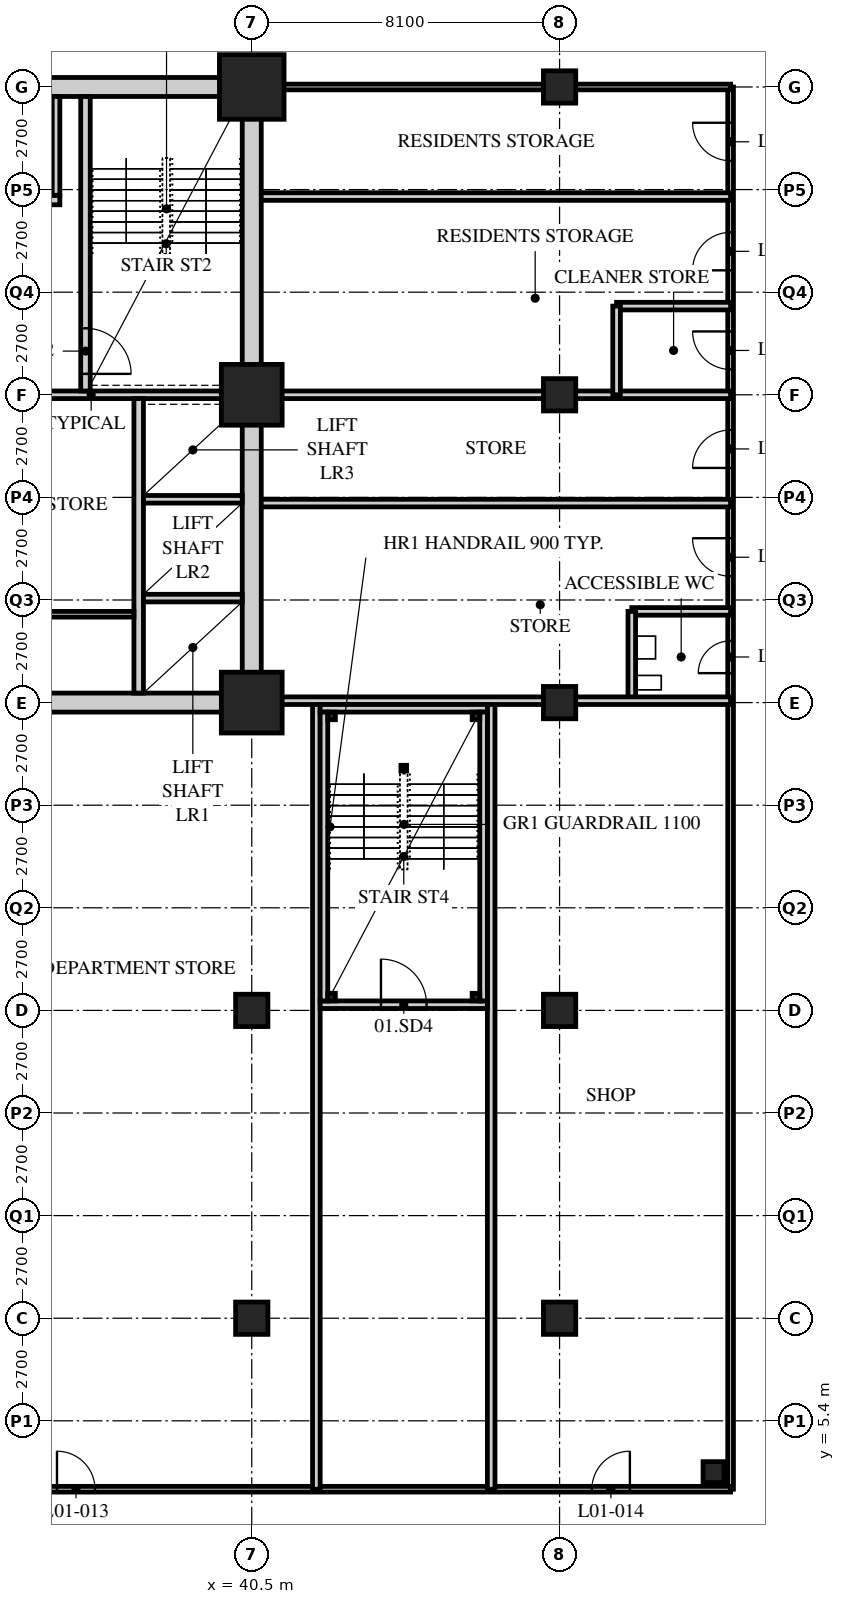
"""IFC4 building model, lengths in metres.
Left out: names, types, materials, properties, quantities, classifications, styles, units other than length and angle.
Written with IfcOpenShell. Run it as: python <this file> out.ifc"""

import sys

from ifc_helpers import new_model, si_unit, direction, frame, frame_2d, origin, origin_2d, place, context, subcontext, project, spatial, rectangle, hollow_rectangle, extrude, element, fill, save


model = new_model("IFC4")
c1 = context("Model", 3, precision=1e-05, world=origin(), true_north=direction((0.0, 1.0)))
c2 = subcontext(c1, "Body", "Model", "MODEL_VIEW")
j1 = project(units=[si_unit("LENGTHUNIT", "METRE"), si_unit("PLANEANGLEUNIT", "RADIAN")], contexts=[c1])
p1 = place(None, origin())
s1 = spatial("IfcSite", under=j1, at=p1, CompositionType="ELEMENT")
p2 = place(p1, origin())
s2 = spatial("IfcBuilding", under=s1, at=p2, CompositionType="ELEMENT")
p3 = place(p2, frame((0.0, 0.0, 6.0)))
s3 = spatial("IfcBuildingStorey", under=s2, at=p3, CompositionType="ELEMENT", Elevation=6.0)
for number, where, z_axis, x_axis in (
    (1, (40.5, 8.1, 0.0), (0.0, 0.0, 1.0), (1.0, 0.0, 0.0)),
    (2, (40.5, 16.2, 0.0), (0.0, 0.0, 1.0), (1.0, 0.0, 0.0)),
):
    element("IfcColumn", number, at=place(p3, frame(where, z_axis=z_axis, x_axis=x_axis)), inside=s3, PredefinedType="COLUMN", context=c2, shape_type="SweptSolid", body=[
        extrude(hollow_rectangle(XDim=0.85, YDim=0.85, WallThickness=0.085, at=origin_2d()), origin(), (0.0, 0.0, 1.0), 5.4),
    ])
for number, where, z_axis, x_axis in (
    (3, (40.5, 24.3, 0.0), (0.0, 0.0, 1.0), (1.0, 0.0, 0.0)),
    (4, (40.5, 32.4, 0.0), (0.0, 0.0, 1.0), (1.0, 0.0, 0.0)),
):
    element("IfcColumn", number, at=place(p3, frame(where, z_axis=z_axis, x_axis=x_axis)), inside=s3, PredefinedType="COLUMN", context=c2, shape_type="SweptSolid", body=[
        extrude(hollow_rectangle(XDim=1.6, YDim=1.6, WallThickness=0.15, at=origin_2d()), origin(), (0.0, 0.0, 1.0), 5.4),
    ])
p4 = place(p3, frame((40.5, 40.5, 0.0), z_axis=(0.0, 0.0, 1.0), x_axis=(1.0, 0.0, 0.0)))
e5 = element("IfcColumn", 5, at=p4, inside=s3, PredefinedType="COLUMN", context=c2, shape_type="SweptSolid", body=[
    extrude(hollow_rectangle(XDim=1.7, YDim=1.7, WallThickness=0.16, at=origin_2d()), origin(), (0.0, 0.0, 1.0), 5.4),
])
for number, where, z_axis, x_axis in (
    (6, (48.6, 8.1, 0.0), (0.0, 0.0, 1.0), (1.0, 0.0, 0.0)),
    (7, (48.6, 16.2, 0.0), (0.0, 0.0, 1.0), (1.0, 0.0, 0.0)),
    (8, (48.6, 24.3, 0.0), (0.0, 0.0, 1.0), (1.0, 0.0, 0.0)),
    (9, (48.6, 32.4, 0.0), (0.0, 0.0, 1.0), (1.0, 0.0, 0.0)),
    (10, (48.6, 40.5, 0.0), (0.0, 0.0, 1.0), (1.0, 0.0, 0.0)),
):
    element("IfcColumn", number, at=place(p3, frame(where, z_axis=z_axis, x_axis=x_axis)), inside=s3, PredefinedType="COLUMN", context=c2, shape_type="SweptSolid", body=[
        extrude(hollow_rectangle(XDim=0.85, YDim=0.85, WallThickness=0.085, at=origin_2d()), origin(), (0.0, 0.0, 1.0), 5.4),
    ])
p5 = place(p3, frame((52.65, 4.05, 0.0), z_axis=(0.0, 0.0, 1.0), x_axis=(1.0, 0.0, 0.0)))
e11 = element("IfcColumn", 11, at=p5, inside=s3, PredefinedType="COLUMN", context=c2, shape_type="SweptSolid", body=[
    extrude(hollow_rectangle(XDim=0.55, YDim=0.55, WallThickness=0.05, at=origin_2d()), origin(), (0.0, 0.0, 1.0), 5.4),
])
p6 = place(p3, frame((53.1, 3.6, 0.0), z_axis=(0.0, 0.0, 1.0), x_axis=(0.0, 1.0, 0.0)))
e12 = element("IfcWall", 12, at=p6, inside=s3, PredefinedType="PARTITIONING", context=c2, shape_type="SweptSolid", body=[
    extrude(rectangle(XDim=36.9, YDim=0.15, at=frame_2d((18.45, 0.0))), origin(), (0.0, 0.0, 1.0), 5.15),
])
p7 = place(p6, frame((21.475, 0.0, 0.0)))
e13 = element("IfcOpeningElement", 13, at=p7, cuts=e12, PredefinedType="OPENING", context=c2, shape_type="SweptSolid", body=[
    extrude(rectangle(XDim=0.85, YDim=2.1, at=frame_2d((0.425, 1.05))), frame((0.0, 0.085, 0.0), z_axis=(0.0, -1.0, 0.0), x_axis=(1.0, 0.0, 0.0)), (0.0, 0.0, 1.0), 0.17),
])
p8 = place(p6, frame((24.025, 0.0, 0.0)))
e14 = element("IfcOpeningElement", 14, at=p8, cuts=e12, PredefinedType="OPENING", context=c2, shape_type="SweptSolid", body=[
    extrude(rectangle(XDim=1.0, YDim=2.1, at=frame_2d((0.5, 1.05))), frame((0.0, 0.085, 0.0), z_axis=(0.0, -1.0, 0.0), x_axis=(1.0, 0.0, 0.0)), (0.0, 0.0, 1.0), 0.17),
])
p9 = place(p6, frame((26.875, 0.0, 0.0)))
e15 = element("IfcOpeningElement", 15, at=p9, cuts=e12, PredefinedType="OPENING", context=c2, shape_type="SweptSolid", body=[
    extrude(rectangle(XDim=1.0, YDim=2.1, at=frame_2d((0.5, 1.05))), frame((0.0, 0.085, 0.0), z_axis=(0.0, -1.0, 0.0), x_axis=(1.0, 0.0, 0.0)), (0.0, 0.0, 1.0), 0.17),
])
p10 = place(p6, frame((29.467, 0.0, 0.0)))
e16 = element("IfcOpeningElement", 16, at=p10, cuts=e12, PredefinedType="OPENING", context=c2, shape_type="SweptSolid", body=[
    extrude(rectangle(XDim=1.0, YDim=2.1, at=frame_2d((0.5, 1.05))), frame((0.0, 0.085, 0.0), z_axis=(0.0, -1.0, 0.0), x_axis=(1.0, 0.0, 0.0)), (0.0, 0.0, 1.0), 0.17),
])
p11 = place(p6, frame((32.075, 0.0, 0.0)))
e17 = element("IfcOpeningElement", 17, at=p11, cuts=e12, PredefinedType="OPENING", context=c2, shape_type="SweptSolid", body=[
    extrude(rectangle(XDim=1.0, YDim=2.1, at=frame_2d((0.5, 1.05))), frame((0.0, 0.085, 0.0), z_axis=(0.0, -1.0, 0.0), x_axis=(1.0, 0.0, 0.0)), (0.0, 0.0, 1.0), 0.17),
])
p12 = place(p6, frame((34.958, 0.0, 0.0)))
e18 = element("IfcOpeningElement", 18, at=p12, cuts=e12, PredefinedType="OPENING", context=c2, shape_type="SweptSolid", body=[
    extrude(rectangle(XDim=1.0, YDim=2.1, at=frame_2d((0.5, 1.05))), frame((0.0, 0.085, 0.0), z_axis=(0.0, -1.0, 0.0), x_axis=(1.0, 0.0, 0.0)), (0.0, 0.0, 1.0), 0.17),
])
p13 = place(p3, frame((53.1, 40.5, 0.0), z_axis=(0.0, 0.0, 1.0), x_axis=(-1.0, 0.0, 0.0)))
e19 = element("IfcWall", 19, at=p13, inside=s3, PredefinedType="PARTITIONING", context=c2, shape_type="SweptSolid", body=[
    extrude(rectangle(XDim=12.4, YDim=0.15, at=frame_2d((6.2, 0.0))), origin(), (0.0, 0.0, 1.0), 4.538),
])
p14 = place(p3, frame((29.56, 3.6, 0.0), z_axis=(0.0, 0.0, 1.0), x_axis=(1.0, 0.0, 0.0)))
e20 = element("IfcWall", 20, at=p14, inside=s3, PredefinedType="PARTITIONING", context=c2, shape_type="SweptSolid", body=[
    extrude(rectangle(XDim=23.54, YDim=0.15, at=frame_2d((11.77, 0.0))), origin(), (0.0, 0.0, 1.0), 5.15),
])
p15 = place(p14, frame((5.815, 0.0, 0.0)))
e21 = element("IfcOpeningElement", 21, at=p15, cuts=e20, PredefinedType="OPENING", context=c2, shape_type="SweptSolid", body=[
    extrude(rectangle(XDim=1.0, YDim=2.1, at=frame_2d((0.5, 1.05))), frame((0.0, 0.085, 0.0), z_axis=(0.0, -1.0, 0.0), x_axis=(1.0, 0.0, 0.0)), (0.0, 0.0, 1.0), 0.17),
])
p16 = place(p14, frame((19.89, 0.0, 0.0)))
e22 = element("IfcOpeningElement", 22, at=p16, cuts=e20, PredefinedType="OPENING", context=c2, shape_type="SweptSolid", body=[
    extrude(rectangle(XDim=1.0, YDim=2.1, at=frame_2d((0.5, 1.05))), frame((0.0, 0.085, 0.0), z_axis=(0.0, -1.0, 0.0), x_axis=(1.0, 0.0, 0.0)), (0.0, 0.0, 1.0), 0.17),
])
p17 = place(p3, frame((40.5, 32.4, 0.0), z_axis=(0.0, 0.0, 1.0), x_axis=(1.0, 0.0, 0.0)))
e23 = element("IfcWall", 23, at=p17, inside=s3, PredefinedType="SOLIDWALL", context=c2, shape_type="SweptSolid", body=[
    extrude(rectangle(XDim=12.6, YDim=0.2, at=frame_2d((6.3, 0.0))), origin(), (0.0, 0.0, 1.0), 4.538),
])
p18 = place(p3, frame((53.1, 26.7, 0.0), z_axis=(0.0, 0.0, 1.0), x_axis=(-1.0, 0.0, 0.0)))
e24 = element("IfcWall", 24, at=p18, inside=s3, PredefinedType="SOLIDWALL", context=c2, shape_type="SweptSolid", body=[
    extrude(rectangle(XDim=2.6, YDim=0.2, at=frame_2d((1.3, 0.0))), origin(), (0.0, 0.0, 1.0), 5.15),
])
p19 = place(p3, frame((50.5, 24.3, 0.0), z_axis=(0.0, 0.0, 1.0), x_axis=(0.0, 1.0, 0.0)))
e25 = element("IfcWall", 25, at=p19, inside=s3, PredefinedType="SOLIDWALL", context=c2, shape_type="SweptSolid", body=[
    extrude(rectangle(XDim=2.4, YDim=0.2, at=frame_2d((1.2, 0.0))), origin(), (0.0, 0.0, 1.0), 5.15),
])
p20 = place(p3, frame((53.1, 29.55, 0.0), z_axis=(0.0, 0.0, 1.0), x_axis=(-1.0, 0.0, 0.0)))
e26 = element("IfcWall", 26, at=p20, inside=s3, PredefinedType="SOLIDWALL", context=c2, shape_type="SweptSolid", body=[
    extrude(rectangle(XDim=12.6, YDim=0.2, at=frame_2d((6.3, 0.0))), origin(), (0.0, 0.0, 1.0), 5.15),
])
p21 = place(p3, frame((53.1, 34.733, 0.0), z_axis=(0.0, 0.0, 1.0), x_axis=(-1.0, 0.0, 0.0)))
e27 = element("IfcWall", 27, at=p21, inside=s3, PredefinedType="SOLIDWALL", context=c2, shape_type="SweptSolid", body=[
    extrude(rectangle(XDim=3.0, YDim=0.2, at=frame_2d((1.5, 0.0))), origin(), (0.0, 0.0, 1.0), 5.15),
])
p22 = place(p3, frame((50.1, 32.4, 0.0), z_axis=(0.0, 0.0, 1.0), x_axis=(0.0, 1.0, 0.0)))
e28 = element("IfcWall", 28, at=p22, inside=s3, PredefinedType="SOLIDWALL", context=c2, shape_type="SweptSolid", body=[
    extrude(rectangle(XDim=2.333, YDim=0.2, at=frame_2d((1.167, 0.0))), origin(), (0.0, 0.0, 1.0), 5.15),
])
p23 = place(p3, frame((53.1, 37.617, 0.0), z_axis=(0.0, 0.0, 1.0), x_axis=(-1.0, 0.0, 0.0)))
e29 = element("IfcWall", 29, at=p23, inside=s3, PredefinedType="SOLIDWALL", context=c2, shape_type="SweptSolid", body=[
    extrude(rectangle(XDim=12.6, YDim=0.2, at=frame_2d((6.3, 0.0))), origin(), (0.0, 0.0, 1.0), 5.15),
])
for number, where, z_axis, x_axis in (
    (30, (42.2, 3.6, 0.0), (0.0, 0.0, 1.0), (0.0, 1.0, 0.0)),
    (31, (46.8, 3.6, 0.0), (0.0, 0.0, 1.0), (0.0, 1.0, 0.0)),
):
    element("IfcWall", number, at=place(p3, frame(where, z_axis=z_axis, x_axis=x_axis)), inside=s3, PredefinedType="SOLIDWALL", context=c2, shape_type="SweptSolid", body=[
        extrude(rectangle(XDim=20.7, YDim=0.2, at=frame_2d((10.35, 0.0))), origin(), (0.0, 0.0, 1.0), 5.15),
    ])
p24 = place(p3, frame((40.5, 24.35, 0.0), z_axis=(0.0, 0.0, 1.0), x_axis=(1.0, 0.0, 0.0)))
e32 = element("IfcWall", 32, at=p24, inside=s3, PredefinedType="SOLIDWALL", context=c2, shape_type="SweptSolid", body=[
    extrude(rectangle(XDim=12.6, YDim=0.2, at=frame_2d((6.3, 0.0))), origin(), (0.0, 0.0, 1.0), 4.538),
])
p25 = place(p3, frame((15.95, 24.3, 0.0), z_axis=(0.0, 0.0, 1.0), x_axis=(1.0, 0.0, 0.0)))
e33 = element("IfcWall", 33, at=p25, inside=s3, PredefinedType="SOLIDWALL", context=c2, shape_type="SweptSolid", body=[
    extrude(rectangle(XDim=24.8, YDim=0.5, at=frame_2d((12.4, 0.0))), origin(), (0.0, 0.0, 1.0), 4.5),
])
p26 = place(p25, frame((11.5, 0.0, 0.0)))
e34 = element("IfcOpeningElement", 34, at=p26, cuts=e33, PredefinedType="OPENING", context=c2, shape_type="SweptSolid", body=[
    extrude(rectangle(XDim=1.8, YDim=2.4, at=frame_2d((0.9, 1.2))), frame((0.0, 0.26, 0.0), z_axis=(0.0, -1.0, 0.0), x_axis=(1.0, 0.0, 0.0)), (0.0, 0.0, 1.0), 0.52),
])
p27 = place(p3, frame((15.95, 40.5, 0.0), z_axis=(0.0, 0.0, 1.0), x_axis=(1.0, 0.0, 0.0)))
e35 = element("IfcWall", 35, at=p27, inside=s3, PredefinedType="SOLIDWALL", context=c2, shape_type="SweptSolid", body=[
    extrude(rectangle(XDim=24.8, YDim=0.5, at=frame_2d((12.4, 0.0))), origin(), (0.0, 0.0, 1.0), 4.5),
])
p28 = place(p27, frame((11.5, 0.0, 0.0)))
e36 = element("IfcOpeningElement", 36, at=p28, cuts=e35, PredefinedType="OPENING", context=c2, shape_type="SweptSolid", body=[
    extrude(rectangle(XDim=1.8, YDim=2.4, at=frame_2d((0.9, 1.2))), frame((0.0, 0.26, 0.0), z_axis=(0.0, -1.0, 0.0), x_axis=(1.0, 0.0, 0.0)), (0.0, 0.0, 1.0), 0.52),
])
p29 = place(p3, frame((40.5, 24.55, 0.0), z_axis=(0.0, 0.0, 1.0), x_axis=(0.0, 1.0, 0.0)))
e37 = element("IfcWall", 37, at=p29, inside=s3, PredefinedType="SOLIDWALL", context=c2, shape_type="SweptSolid", body=[
    extrude(rectangle(XDim=15.7, YDim=0.5, at=frame_2d((7.85, 0.0))), origin(), (0.0, 0.0, 1.0), 4.538),
])
p30 = place(p3, frame((32.3, 32.4, 0.0), z_axis=(0.0, 0.0, 1.0), x_axis=(1.0, 0.0, 0.0)))
e38 = element("IfcWall", 38, at=p30, inside=s3, PredefinedType="SOLIDWALL", context=c2, shape_type="SweptSolid", body=[
    extrude(rectangle(XDim=7.95, YDim=0.2, at=frame_2d((3.975, 0.0))), origin(), (0.0, 0.0, 1.0), 4.45),
])
p31 = place(p3, frame((37.525, 24.55, 0.0), z_axis=(0.0, 0.0, 1.0), x_axis=(0.0, 1.0, 0.0)))
e39 = element("IfcWall", 39, at=p31, inside=s3, PredefinedType="SOLIDWALL", context=c2, shape_type="SweptSolid", body=[
    extrude(rectangle(XDim=7.75, YDim=0.25, at=frame_2d((3.875, 0.0))), origin(), (0.0, 0.0, 1.0), 5.15),
])
for number, where, z_axis, x_axis in (
    (40, (37.65, 27.05, 0.0), (0.0, 0.0, 1.0), (1.0, 0.0, 0.0)),
    (41, (37.65, 29.65, 0.0), (0.0, 0.0, 1.0), (1.0, 0.0, 0.0)),
):
    element("IfcWall", number, at=place(p3, frame(where, z_axis=z_axis, x_axis=x_axis)), inside=s3, PredefinedType="SOLIDWALL", context=c2, shape_type="SweptSolid", body=[
        extrude(rectangle(XDim=2.6, YDim=0.2, at=frame_2d((1.3, 0.0))), origin(), (0.0, 0.0, 1.0), 5.15),
    ])
p32 = place(p3, frame((36.125, 32.5, 0.0), z_axis=(0.0, 0.0, 1.0), x_axis=(0.0, 1.0, 0.0)))
e42 = element("IfcWall", 42, at=p32, inside=s3, PredefinedType="SOLIDWALL", context=c2, shape_type="SweptSolid", body=[
    extrude(rectangle(XDim=7.75, YDim=0.25, at=frame_2d((3.875, 0.0))), origin(), (0.0, 0.0, 1.0), 5.15),
])
p33 = place(p32, frame((0.45, 0.0, 0.0)))
e43 = element("IfcOpeningElement", 43, at=p33, cuts=e42, PredefinedType="OPENING", context=c2, shape_type="SweptSolid", body=[
    extrude(rectangle(XDim=1.2, YDim=2.1, at=frame_2d((0.6, 1.05))), frame((0.0, 0.135, 0.0), z_axis=(0.0, -1.0, 0.0), x_axis=(1.0, 0.0, 0.0)), (0.0, 0.0, 1.0), 0.27),
])
p34 = place(p3, frame((32.5, 37.525, 0.0), z_axis=(0.0, 0.0, 1.0), x_axis=(1.0, 0.0, 0.0)))
e44 = element("IfcWall", 44, at=p34, inside=s3, PredefinedType="SOLIDWALL", context=c2, shape_type="SweptSolid", body=[
    extrude(rectangle(XDim=2.95, YDim=0.25, at=frame_2d((1.475, 0.0))), origin(), (0.0, 0.0, 1.0), 5.15),
])
p35 = place(p34, frame((0.9, 0.0, 0.0)))
e45 = element("IfcOpeningElement", 45, at=p35, cuts=e44, PredefinedType="OPENING", context=c2, shape_type="SweptSolid", body=[
    extrude(rectangle(XDim=1.1, YDim=2.4, at=frame_2d((0.55, 1.2))), frame((0.0, 0.135, 0.0), z_axis=(0.0, -1.0, 0.0), x_axis=(1.0, 0.0, 0.0)), (0.0, 0.0, 1.0), 0.27),
])
p36 = place(p3, frame((35.35, 37.65, 0.0), z_axis=(0.0, 0.0, 1.0), x_axis=(0.0, 1.0, 0.0)))
e46 = element("IfcWall", 46, at=p36, inside=s3, PredefinedType="SOLIDWALL", context=c2, shape_type="SweptSolid", body=[
    extrude(rectangle(XDim=2.6, YDim=0.2, at=frame_2d((1.3, 0.0))), origin(), (0.0, 0.0, 1.0), 5.15),
])
p37 = place(p3, frame((32.5, 26.625, 0.0), z_axis=(0.0, 0.0, 1.0), x_axis=(1.0, 0.0, 0.0)))
e47 = element("IfcWall", 47, at=p37, inside=s3, PredefinedType="PARTITIONING", context=c2, shape_type="SweptSolid", body=[
    extrude(rectangle(XDim=4.9, YDim=0.15, at=frame_2d((2.45, 0.0))), origin(), (0.0, 0.0, 1.0), 5.15),
])
p38 = place(p3, frame((42.3, 16.35, 0.0), z_axis=(0.0, 0.0, 1.0), x_axis=(1.0, 0.0, 0.0)))
e48 = element("IfcWall", 48, at=p38, inside=s3, PredefinedType="SOLIDWALL", context=c2, shape_type="SweptSolid", body=[
    extrude(rectangle(XDim=4.4, YDim=0.2, at=frame_2d((2.2, 0.0))), origin(), (0.0, 0.0, 1.0), 4.538),
])
p39 = place(p38, frame((1.6, 0.0, 0.0)))
e49 = element("IfcOpeningElement", 49, at=p39, cuts=e48, PredefinedType="OPENING", context=c2, shape_type="SweptSolid", body=[
    extrude(rectangle(XDim=1.2, YDim=2.1, at=frame_2d((0.6, 1.05))), frame((0.0, 0.11, 0.0), z_axis=(0.0, -1.0, 0.0), x_axis=(1.0, 0.0, 0.0)), (0.0, 0.0, 1.0), 0.22),
])
p40 = place(p3, frame((42.3, 24.15, 0.0), z_axis=(0.0, 0.0, 1.0), x_axis=(1.0, 0.0, 0.0)))
e50 = element("IfcWall", 50, at=p40, inside=s3, PredefinedType="SOLIDWALL", context=c2, shape_type="SweptSolid", body=[
    extrude(rectangle(XDim=4.4, YDim=0.2, at=frame_2d((2.2, 0.0))), origin(), (0.0, 0.0, 1.0), 4.538),
])
for number, where, z_axis, x_axis in (
    (51, (42.4, 16.45, 0.0), (0.0, 0.0, 1.0), (0.0, 1.0, 0.0)),
    (52, (46.6, 16.45, 0.0), (0.0, 0.0, 1.0), (0.0, 1.0, 0.0)),
):
    element("IfcWall", number, at=place(p3, frame(where, z_axis=z_axis, x_axis=x_axis)), inside=s3, PredefinedType="SOLIDWALL", context=c2, shape_type="SweptSolid", body=[
        extrude(rectangle(XDim=7.6, YDim=0.2, at=frame_2d((3.8, 0.0))), origin(), (0.0, 0.0, 1.0), 5.15),
    ])
for number, where, z_axis, x_axis in (
    (53, (42.6, 23.95, 0.0), (0.0, 0.0, 1.0), (1.0, 0.0, 0.0)),
    (54, (46.4, 23.95, 0.0), (0.0, 0.0, 1.0), (1.0, 0.0, 0.0)),
    (55, (42.6, 16.55, 0.0), (0.0, 0.0, 1.0), (1.0, 0.0, 0.0)),
    (56, (46.4, 16.55, 0.0), (0.0, 0.0, 1.0), (1.0, 0.0, 0.0)),
):
    element("IfcColumn", number, at=place(p3, frame(where, z_axis=z_axis, x_axis=x_axis)), inside=s3, PredefinedType="COLUMN", context=c2, shape_type="SweptSolid", body=[
        extrude(hollow_rectangle(XDim=0.2, YDim=0.2, WallThickness=0.012, at=origin_2d()), origin(), (0.0, 0.0, 1.0), 5.4),
    ])
p41 = place(p3, frame((44.5, 22.575, 0.0), z_axis=(0.0, 0.0, 1.0), x_axis=(1.0, 0.0, 0.0)))
e57 = element("IfcColumn", 57, at=p41, inside=s3, PredefinedType="COLUMN", context=c2, shape_type="SweptSolid", body=[
    extrude(hollow_rectangle(XDim=0.15, YDim=0.15, WallThickness=0.01, at=origin_2d()), origin(), (0.0, 0.0, 1.0), 5.4),
])
p42 = place(p7, origin())
e58 = element("IfcDoor", 58, at=p42, inside=s3, OperationType="SINGLE_SWING_LEFT", PredefinedType="DOOR", context=c2, shape_type="SweptSolid", body=[
    extrude(rectangle(XDim=0.85, YDim=2.1, at=frame_2d((0.425, 1.05))), frame((0.0, 0.025, 0.0), z_axis=(0.0, -1.0, 0.0), x_axis=(1.0, 0.0, 0.0)), (0.0, 0.0, 1.0), 0.05),
])
fill(e13, e58)
p43 = place(p8, origin())
e59 = element("IfcDoor", 59, at=p43, inside=s3, OperationType="SINGLE_SWING_RIGHT", PredefinedType="DOOR", context=c2, shape_type="SweptSolid", body=[
    extrude(rectangle(XDim=1.0, YDim=2.1, at=frame_2d((0.5, 1.05))), frame((0.0, 0.025, 0.0), z_axis=(0.0, -1.0, 0.0), x_axis=(1.0, 0.0, 0.0)), (0.0, 0.0, 1.0), 0.05),
])
fill(e14, e59)
p44 = place(p9, origin())
e60 = element("IfcDoor", 60, at=p44, inside=s3, OperationType="SINGLE_SWING_LEFT", PredefinedType="DOOR", context=c2, shape_type="SweptSolid", body=[
    extrude(rectangle(XDim=1.0, YDim=2.1, at=frame_2d((0.5, 1.05))), frame((0.0, 0.025, 0.0), z_axis=(0.0, -1.0, 0.0), x_axis=(1.0, 0.0, 0.0)), (0.0, 0.0, 1.0), 0.05),
])
fill(e15, e60)
p45 = place(p10, origin())
e61 = element("IfcDoor", 61, at=p45, inside=s3, OperationType="SINGLE_SWING_RIGHT", PredefinedType="DOOR", context=c2, shape_type="SweptSolid", body=[
    extrude(rectangle(XDim=1.0, YDim=2.1, at=frame_2d((0.5, 1.05))), frame((0.0, 0.025, 0.0), z_axis=(0.0, -1.0, 0.0), x_axis=(1.0, 0.0, 0.0)), (0.0, 0.0, 1.0), 0.05),
])
fill(e16, e61)
p46 = place(p11, origin())
e62 = element("IfcDoor", 62, at=p46, inside=s3, OperationType="SINGLE_SWING_LEFT", PredefinedType="DOOR", context=c2, shape_type="SweptSolid", body=[
    extrude(rectangle(XDim=1.0, YDim=2.1, at=frame_2d((0.5, 1.05))), frame((0.0, 0.025, 0.0), z_axis=(0.0, -1.0, 0.0), x_axis=(1.0, 0.0, 0.0)), (0.0, 0.0, 1.0), 0.05),
])
fill(e17, e62)
p47 = place(p12, origin())
e63 = element("IfcDoor", 63, at=p47, inside=s3, OperationType="SINGLE_SWING_RIGHT", PredefinedType="DOOR", context=c2, shape_type="SweptSolid", body=[
    extrude(rectangle(XDim=1.0, YDim=2.1, at=frame_2d((0.5, 1.05))), frame((0.0, 0.025, 0.0), z_axis=(0.0, -1.0, 0.0), x_axis=(1.0, 0.0, 0.0)), (0.0, 0.0, 1.0), 0.05),
])
fill(e18, e63)
p48 = place(p15, origin())
e64 = element("IfcDoor", 64, at=p48, inside=s3, OperationType="SINGLE_SWING_LEFT", PredefinedType="DOOR", context=c2, shape_type="SweptSolid", body=[
    extrude(rectangle(XDim=1.0, YDim=2.1, at=frame_2d((0.5, 1.05))), frame((0.0, 0.025, 0.0), z_axis=(0.0, -1.0, 0.0), x_axis=(1.0, 0.0, 0.0)), (0.0, 0.0, 1.0), 0.05),
])
fill(e21, e64)
p49 = place(p16, origin())
e65 = element("IfcDoor", 65, at=p49, inside=s3, OperationType="SINGLE_SWING_RIGHT", PredefinedType="DOOR", context=c2, shape_type="SweptSolid", body=[
    extrude(rectangle(XDim=1.0, YDim=2.1, at=frame_2d((0.5, 1.05))), frame((0.0, 0.025, 0.0), z_axis=(0.0, -1.0, 0.0), x_axis=(1.0, 0.0, 0.0)), (0.0, 0.0, 1.0), 0.05),
])
fill(e22, e65)
p50 = place(p33, origin())
e66 = element("IfcDoor", 66, at=p50, inside=s3, OperationType="SINGLE_SWING_RIGHT", PredefinedType="DOOR", context=c2, shape_type="SweptSolid", body=[
    extrude(rectangle(XDim=1.2, YDim=2.1, at=frame_2d((0.6, 1.05))), frame((0.0, 0.025, 0.0), z_axis=(0.0, -1.0, 0.0), x_axis=(1.0, 0.0, 0.0)), (0.0, 0.0, 1.0), 0.05),
])
fill(e43, e66)
p51 = place(p39, origin())
e67 = element("IfcDoor", 67, at=p51, inside=s3, OperationType="SINGLE_SWING_LEFT", PredefinedType="DOOR", context=c2, shape_type="SweptSolid", body=[
    extrude(rectangle(XDim=1.2, YDim=2.1, at=frame_2d((0.6, 1.05))), frame((0.0, 0.025, 0.0), z_axis=(0.0, -1.0, 0.0), x_axis=(1.0, 0.0, 0.0)), (0.0, 0.0, 1.0), 0.05),
])
fill(e49, e67)
save(model, sys.argv[1])
